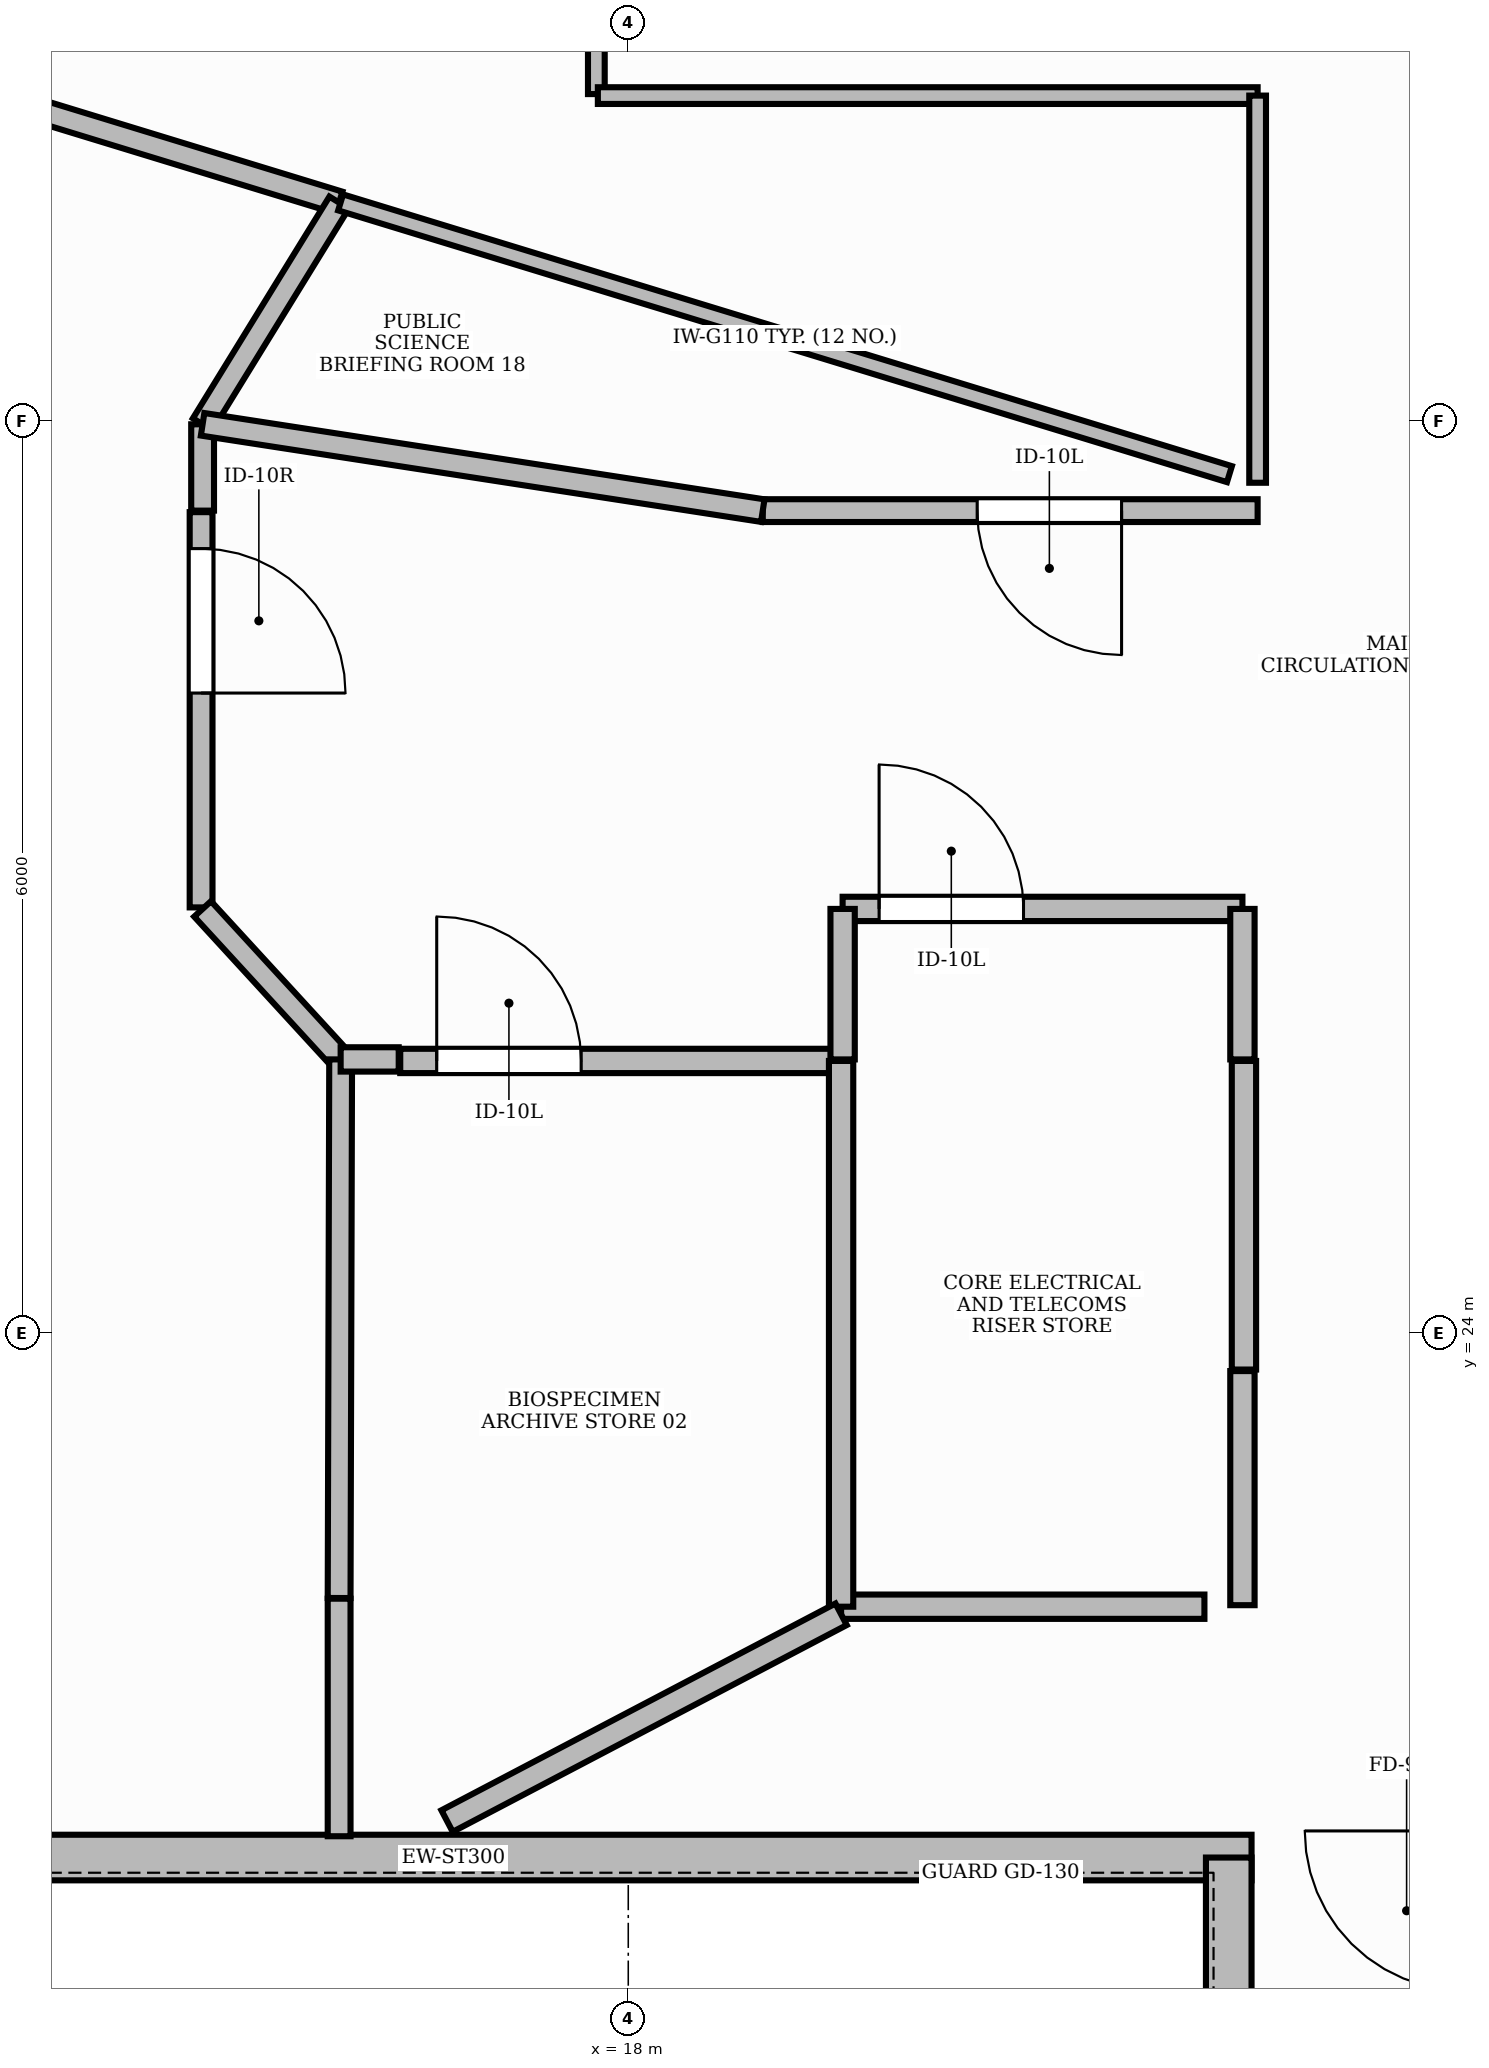
"""IFC4 building model, lengths in metres.
Left out: names, types, materials, properties, quantities, classifications, styles, units other than length and angle.
Written with IfcOpenShell. Run it as: python <this file> out.ifc"""

import sys

from ifc_helpers import new_model, si_unit, direction, frame, frame_2d, origin, place, context, subcontext, project, spatial, rectangle, extrude, element, fill, save


model = new_model("IFC4")
c1 = context("Model", 3, precision=1e-05, world=origin(), true_north=direction((0.0, 1.0)))
c2 = subcontext(c1, "Body", "Model", "MODEL_VIEW")
j1 = project(units=[si_unit("LENGTHUNIT", "METRE"), si_unit("PLANEANGLEUNIT", "RADIAN")], contexts=[c1])
p1 = place(None, origin())
s1 = spatial("IfcSite", under=j1, at=p1, CompositionType="ELEMENT")
p2 = place(p1, origin())
s2 = spatial("IfcBuilding", under=s1, at=p2, CompositionType="ELEMENT")
p3 = place(p2, frame((0.0, 0.0, 291.0)))
s3 = spatial("IfcBuildingStorey", under=s2, at=p3, CompositionType="ELEMENT", Elevation=291.0)
p4 = place(p3, frame((11.6, 20.55, 0.0), z_axis=(0.0, 0.0, 1.0), x_axis=(1.0, 0.0, 0.0)))
e1 = element("IfcWall", 1, at=p4, inside=s3, PredefinedType="STANDARD", context=c2, shape_type="SweptSolid", body=[
    extrude(rectangle(XDim=10.5, YDim=0.3, at=frame_2d((5.25, 0.0))), origin(), (0.0, 0.0, 1.0), 6.3),
])
p5 = place(p3, frame((21.95, 9.4, 0.0), z_axis=(0.0, 0.0, 1.0), x_axis=(0.0, 1.0, 0.0)))
e2 = element("IfcWall", 2, at=p5, inside=s3, PredefinedType="STANDARD", context=c2, shape_type="SweptSolid", body=[
    extrude(rectangle(XDim=11.15, YDim=0.3, at=frame_2d((5.575, 0.0))), origin(), (0.0, 0.0, 1.0), 4.625),
])
p6 = place(p3, frame((19.41, 26.79, 0.0), z_axis=(0.0, 0.0, 1.0), x_axis=(1.0, 0.0, 0.0)))
e3 = element("IfcWall", 3, at=p6, inside=s3, PredefinedType="PARTITIONING", context=c2, shape_type="SweptSolid", body=[
    extrude(rectangle(XDim=2.63, YDim=0.16, at=frame_2d((1.315, 0.0))), origin(), (0.0, 0.0, 1.0), 4.61),
])
p7 = place(p6, frame((0.24, 0.0, 0.0)))
e4 = element("IfcOpeningElement", 4, at=p7, cuts=e3, PredefinedType="OPENING", context=c2, shape_type="SweptSolid", body=[
    extrude(rectangle(XDim=0.95, YDim=2.15, at=frame_2d((0.475, 1.075))), frame((0.0, 0.095, 0.0), z_axis=(0.0, -1.0, 0.0), x_axis=(1.0, 0.0, 0.0)), (0.0, 0.0, 1.0), 0.19),
])
p8 = place(p3, frame((15.19, 29.4, 0.0), z_axis=(0.0, 0.0, 1.0), x_axis=(0.0, -1.0, 0.0)))
e5 = element("IfcWall", 5, at=p8, inside=s3, PredefinedType="PARTITIONING", context=c2, shape_type="SweptSolid", body=[
    extrude(rectangle(XDim=2.6, YDim=0.15, at=frame_2d((1.3, 0.0))), origin(), (0.0, 0.0, 1.0), 4.61),
])
p9 = place(p8, frame((0.24, 0.0, 0.0)))
e6 = element("IfcOpeningElement", 6, at=p9, cuts=e5, PredefinedType="OPENING", context=c2, shape_type="SweptSolid", body=[
    extrude(rectangle(XDim=0.95, YDim=2.15, at=frame_2d((0.475, 1.075))), frame((0.0, 0.09, 0.0), z_axis=(0.0, -1.0, 0.0), x_axis=(1.0, 0.0, 0.0)), (0.0, 0.0, 1.0), 0.18),
])
p10 = place(p3, frame((16.5, 25.79, 0.0), z_axis=(0.0, 0.0, 1.0), x_axis=(1.0, 0.0, 0.0)))
e7 = element("IfcWall", 7, at=p10, inside=s3, PredefinedType="PARTITIONING", context=c2, shape_type="SweptSolid", body=[
    extrude(rectangle(XDim=2.89, YDim=0.16, at=frame_2d((1.445, 0.0))), origin(), (0.0, 0.0, 1.0), 4.61),
])
p11 = place(p10, frame((0.24, 0.0, 0.0)))
e8 = element("IfcOpeningElement", 8, at=p11, cuts=e7, PredefinedType="OPENING", context=c2, shape_type="SweptSolid", body=[
    extrude(rectangle(XDim=0.95, YDim=2.15, at=frame_2d((0.475, 1.075))), frame((0.0, 0.095, 0.0), z_axis=(0.0, -1.0, 0.0), x_axis=(1.0, 0.0, 0.0)), (0.0, 0.0, 1.0), 0.19),
])
p12 = place(p3, frame((22.14, 29.41, 0.0), z_axis=(0.0, 0.0, 1.0), x_axis=(-1.0, 0.0, 0.0)))
e9 = element("IfcWall", 9, at=p12, inside=s3, PredefinedType="PARTITIONING", context=c2, shape_type="SweptSolid", body=[
    extrude(rectangle(XDim=3.255, YDim=0.15, at=frame_2d((1.627, 0.0))), origin(), (0.0, 0.0, 1.0), 4.61),
])
p13 = place(p12, frame((0.895, 0.0, 0.0)))
e10 = element("IfcOpeningElement", 10, at=p13, cuts=e9, PredefinedType="OPENING", context=c2, shape_type="SweptSolid", body=[
    extrude(rectangle(XDim=0.95, YDim=2.15, at=frame_2d((0.475, 1.075))), frame((0.0, 0.09, 0.0), z_axis=(0.0, -1.0, 0.0), x_axis=(1.0, 0.0, 0.0)), (0.0, 0.0, 1.0), 0.18),
])
p14 = place(p3, frame((22.04, 23.75, 0.0), z_axis=(0.0, 0.0, 1.0), x_axis=(0.0, -1.0, 0.0)))
e11 = element("IfcWall", 11, at=p14, inside=s3, PredefinedType="PARTITIONING", context=c2, shape_type="SweptSolid", body=[
    extrude(rectangle(XDim=1.54, YDim=0.16, at=frame_2d((0.77, 0.0))), origin(), (0.0, 0.0, 1.0), 4.61),
])
p15 = place(p3, frame((21.79, 22.2, 0.0), z_axis=(0.0, 0.0, 1.0), x_axis=(-1.0, 0.0, 0.0)))
e12 = element("IfcWall", 12, at=p15, inside=s3, PredefinedType="PARTITIONING", context=c2, shape_type="SweptSolid", body=[
    extrude(rectangle(XDim=2.39, YDim=0.16, at=frame_2d((1.195, 0.0))), origin(), (0.0, 0.0, 1.0), 4.61),
])
p16 = place(p3, frame((19.4, 22.2, 0.0), z_axis=(0.0, 0.0, 1.0), x_axis=(0.0, 1.0, 0.0)))
e13 = element("IfcWall", 13, at=p16, inside=s3, PredefinedType="PARTITIONING", context=c2, shape_type="SweptSolid", body=[
    extrude(rectangle(XDim=3.59, YDim=0.16, at=frame_2d((1.795, 0.0))), origin(), (0.0, 0.0, 1.0), 4.61),
])
for number, where, z_axis, x_axis in (
    (14, (19.41, 25.8, 0.0), (0.0, 0.0, 1.0), (0.0, 1.0, 0.0)),
    (15, (22.04, 26.79, 0.0), (0.0, 0.0, 1.0), (0.0, -1.0, 0.0)),
):
    element("IfcWall", number, at=place(p3, frame(where, z_axis=z_axis, x_axis=x_axis)), inside=s3, PredefinedType="PARTITIONING", context=c2, shape_type="SweptSolid", body=[
        extrude(rectangle(XDim=0.99, YDim=0.16, at=frame_2d((0.495, 0.0))), origin(), (0.0, 0.0, 1.0), 4.61),
    ])
p17 = place(p3, frame((22.05, 25.79, 0.0), z_axis=(0.0, 0.0, 1.0), x_axis=(0.0, -1.0, 0.0)))
e16 = element("IfcWall", 16, at=p17, inside=s3, PredefinedType="PARTITIONING", context=c2, shape_type="SweptSolid", body=[
    extrude(rectangle(XDim=2.03, YDim=0.16, at=frame_2d((1.015, 0.0))), origin(), (0.0, 0.0, 1.0), 4.61),
])
p18 = place(p3, frame((11.395, 32.874, 0.0), z_axis=(0.0, 0.0, 1.0), x_axis=(0.956304539226, -0.292372413638, 0.0)))
e17 = element("IfcWall", 17, at=p18, inside=s3, PredefinedType="PARTITIONING", context=c2, shape_type="SweptSolid", body=[
    extrude(rectangle(XDim=4.917, YDim=0.15, at=frame_2d((2.459, 0.0))), origin(), (0.0, 0.0, 1.0), 4.61),
])
p19 = place(p3, frame((16.098, 31.436, 0.0), z_axis=(0.0, 0.0, 1.0), x_axis=(-0.52427238129, -0.851550626925, 0.0)))
e18 = element("IfcWall", 18, at=p19, inside=s3, PredefinedType="PARTITIONING", context=c2, shape_type="SweptSolid", body=[
    extrude(rectangle(XDim=1.713, YDim=0.15, at=frame_2d((0.856, 0.0))), origin(), (0.0, 0.0, 1.0), 4.61),
])
p20 = place(p3, frame((15.2, 29.978, 0.0), z_axis=(0.0, 0.0, 1.0), x_axis=(0.0, -1.0, 0.0)))
e19 = element("IfcWall", 19, at=p20, inside=s3, PredefinedType="PARTITIONING", context=c2, shape_type="SweptSolid", body=[
    extrude(rectangle(XDim=0.568, YDim=0.15, at=frame_2d((0.284, 0.0))), origin(), (0.0, 0.0, 1.0), 4.61),
])
p21 = place(p3, frame((15.2, 26.79, 0.0), z_axis=(0.0, 0.0, 1.0), x_axis=(0.675913896559, -0.736980599771, 0.0)))
e20 = element("IfcWall", 20, at=p21, inside=s3, PredefinedType="PARTITIONING", context=c2, shape_type="SweptSolid", body=[
    extrude(rectangle(XDim=1.343, YDim=0.15, at=frame_2d((0.672, 0.0))), origin(), (0.0, 0.0, 1.0), 4.61),
])
p22 = place(p3, frame((16.108, 25.8, 0.0), z_axis=(0.0, 0.0, 1.0), x_axis=(-0.002825236795, -0.999996009011, 0.0)))
e21 = element("IfcWall", 21, at=p22, inside=s3, PredefinedType="PARTITIONING", context=c2, shape_type="SweptSolid", body=[
    extrude(rectangle(XDim=3.543, YDim=0.15, at=frame_2d((1.771, 0.0))), origin(), (0.0, 0.0, 1.0), 4.61),
])
p23 = place(p3, frame((16.098, 22.253, 0.0), z_axis=(0.0, 0.0, 1.0), x_axis=(0.0, -1.0, 0.0)))
e22 = element("IfcWall", 22, at=p23, inside=s3, PredefinedType="PARTITIONING", context=c2, shape_type="SweptSolid", body=[
    extrude(rectangle(XDim=1.562, YDim=0.15, at=frame_2d((0.781, 0.0))), origin(), (0.0, 0.0, 1.0), 4.61),
])
p24 = place(p3, frame((16.108, 25.8, 0.0), z_axis=(0.0, 0.0, 1.0), x_axis=(1.0, 0.0, 0.0)))
e23 = element("IfcWall", 23, at=p24, inside=s3, PredefinedType="PARTITIONING", context=c2, shape_type="SweptSolid", body=[
    extrude(rectangle(XDim=0.382, YDim=0.16, at=frame_2d((0.191, 0.0))), origin(), (0.0, 0.0, 1.0), 4.61),
])
p25 = place(p3, frame((19.4, 22.15, 0.0), z_axis=(0.0, 0.0, 1.0), x_axis=(-0.885480277224, -0.464676961606, 0.0)))
e24 = element("IfcWall", 24, at=p25, inside=s3, PredefinedType="PARTITIONING", context=c2, shape_type="SweptSolid", body=[
    extrude(rectangle(XDim=2.927, YDim=0.16, at=frame_2d((1.463, 0.0))), origin(), (0.0, 0.0, 1.0), 4.61),
])
p26 = place(p3, frame((17.79, 34.55, 0.0), z_axis=(0.0, 0.0, 1.0), x_axis=(0.0, -1.0, 0.0)))
e25 = element("IfcWall", 25, at=p26, inside=s3, PredefinedType="MOVABLE", context=c2, shape_type="SweptSolid", body=[
    extrude(rectangle(XDim=2.4, YDim=0.11, at=frame_2d((1.2, 0.0))), origin(), (0.0, 0.0, 1.0), 4.61),
])
p27 = place(p3, frame((17.8, 32.14, 0.0), z_axis=(0.0, 0.0, 1.0), x_axis=(1.0, 0.0, 0.0)))
e26 = element("IfcWall", 26, at=p27, inside=s3, PredefinedType="MOVABLE", context=c2, shape_type="SweptSolid", body=[
    extrude(rectangle(XDim=4.34, YDim=0.11, at=frame_2d((2.17, 0.0))), origin(), (0.0, 0.0, 1.0), 4.61),
])
p28 = place(p3, frame((22.14, 32.14, 0.0), z_axis=(0.0, 0.0, 1.0), x_axis=(0.0, -1.0, 0.0)))
e27 = element("IfcWall", 27, at=p28, inside=s3, PredefinedType="MOVABLE", context=c2, shape_type="SweptSolid", body=[
    extrude(rectangle(XDim=2.547, YDim=0.11, at=frame_2d((1.273, 0.0))), origin(), (0.0, 0.0, 1.0), 4.61),
])
p29 = place(p3, frame((21.955, 29.65, 0.0), z_axis=(0.0, 0.0, 1.0), x_axis=(-0.956300718174, 0.292384911411, 0.0)))
e28 = element("IfcWall", 28, at=p29, inside=s3, PredefinedType="MOVABLE", context=c2, shape_type="SweptSolid", body=[
    extrude(rectangle(XDim=6.114, YDim=0.11, at=frame_2d((3.057, 0.0))), origin(), (0.0, 0.0, 1.0), 4.61),
])
p30 = place(p3, frame((18.885, 29.41, 0.0), z_axis=(0.0, 0.0, 1.0), x_axis=(-0.988332299131, 0.152313054249, 0.0)))
e29 = element("IfcWall", 29, at=p30, inside=s3, PredefinedType="PARTITIONING", context=c2, shape_type="SweptSolid", body=[
    extrude(rectangle(XDim=3.728, YDim=0.15, at=frame_2d((1.864, 0.0))), origin(), (0.0, 0.0, 1.0), 4.61),
])
p31 = place(p7, origin())
e30 = element("IfcDoor", 30, at=p31, inside=s3, OperationType="SINGLE_SWING_LEFT", PredefinedType="DOOR", context=c2, shape_type="SweptSolid", body=[
    extrude(rectangle(XDim=0.95, YDim=2.15, at=frame_2d((0.475, 1.075))), frame((0.0, 0.025, 0.0), z_axis=(0.0, -1.0, 0.0), x_axis=(1.0, 0.0, 0.0)), (0.0, 0.0, 1.0), 0.05),
])
fill(e4, e30)
p32 = place(p9, origin())
e31 = element("IfcDoor", 31, at=p32, inside=s3, OperationType="SINGLE_SWING_RIGHT", PredefinedType="DOOR", context=c2, shape_type="SweptSolid", body=[
    extrude(rectangle(XDim=0.95, YDim=2.15, at=frame_2d((0.475, 1.075))), frame((0.0, 0.025, 0.0), z_axis=(0.0, -1.0, 0.0), x_axis=(1.0, 0.0, 0.0)), (0.0, 0.0, 1.0), 0.05),
])
fill(e6, e31)
p33 = place(p11, origin())
e32 = element("IfcDoor", 32, at=p33, inside=s3, OperationType="SINGLE_SWING_LEFT", PredefinedType="DOOR", context=c2, shape_type="SweptSolid", body=[
    extrude(rectangle(XDim=0.95, YDim=2.15, at=frame_2d((0.475, 1.075))), frame((0.0, 0.025, 0.0), z_axis=(0.0, -1.0, 0.0), x_axis=(1.0, 0.0, 0.0)), (0.0, 0.0, 1.0), 0.05),
])
fill(e8, e32)
p34 = place(p13, origin())
e33 = element("IfcDoor", 33, at=p34, inside=s3, OperationType="SINGLE_SWING_LEFT", PredefinedType="DOOR", context=c2, shape_type="SweptSolid", body=[
    extrude(rectangle(XDim=0.95, YDim=2.15, at=frame_2d((0.475, 1.075))), frame((0.0, 0.025, 0.0), z_axis=(0.0, -1.0, 0.0), x_axis=(1.0, 0.0, 0.0)), (0.0, 0.0, 1.0), 0.05),
])
fill(e10, e33)
save(model, sys.argv[1])
